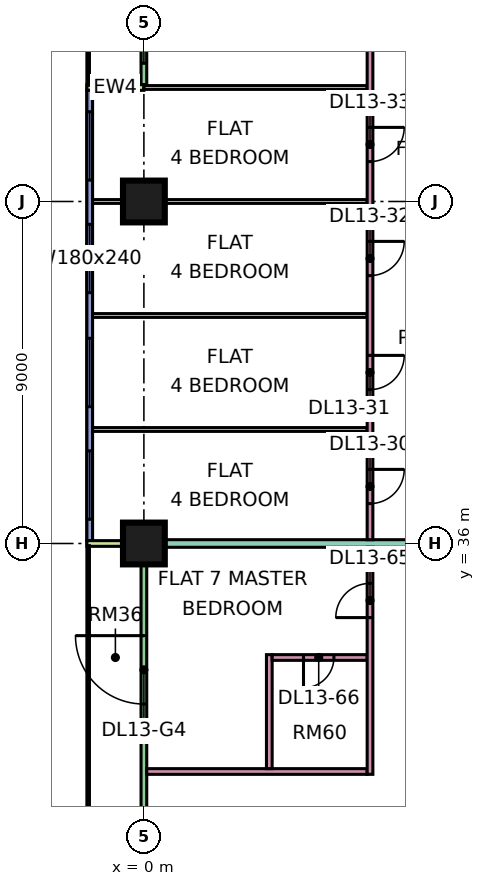
"""IFC4 building model, lengths in metres.
Left out: names, types, materials, properties, quantities, classifications, styles, units other than length and angle.
Written with IfcOpenShell. Run it as: python <this file> out.ifc"""

import sys

from ifc_helpers import new_model, si_unit, direction, frame, frame_2d, origin, origin_2d, place, context, subcontext, project, spatial, rectangle, extrude, element, fill, save


model = new_model("IFC4")
c1 = context("Model", 3, precision=1e-05, world=origin(), true_north=direction((0.0, 1.0)))
c2 = subcontext(c1, "Body", "Model", "MODEL_VIEW")
j1 = project(units=[si_unit("LENGTHUNIT", "METRE"), si_unit("PLANEANGLEUNIT", "RADIAN")], contexts=[c1])
p1 = place(None, origin())
s1 = spatial("IfcSite", under=j1, at=p1, CompositionType="ELEMENT")
p2 = place(p1, origin())
s2 = spatial("IfcBuilding", under=s1, at=p2, CompositionType="ELEMENT")
p3 = place(p2, frame((0.0, 0.0, 63.9)))
s3 = spatial("IfcBuildingStorey", under=s2, at=p3, CompositionType="ELEMENT", Elevation=63.9)
p4 = place(p3, frame((0.0, 36.0, 0.0), z_axis=(0.0, 0.0, 1.0), x_axis=(1.0, 0.0, 0.0)))
e1 = element("IfcColumn", 1, at=p4, inside=s3, PredefinedType="COLUMN", context=c2, shape_type="SweptSolid", body=[
    extrude(rectangle(XDim=1.1, YDim=1.1, at=origin_2d()), origin(), (0.0, 0.0, 1.0), 3.75),
])
p5 = place(p3, frame((0.0, 45.0, 0.0), z_axis=(0.0, 0.0, 1.0), x_axis=(1.0, 0.0, 0.0)))
e2 = element("IfcColumn", 2, at=p5, inside=s3, PredefinedType="COLUMN", context=c2, shape_type="SweptSolid", body=[
    extrude(rectangle(XDim=1.1, YDim=1.1, at=origin_2d()), origin(), (0.0, 0.0, 1.0), 3.75),
])
p6 = place(p3, frame((0.0, 61.425, 0.0), z_axis=(0.0, 0.0, 1.0), x_axis=(0.0, -1.0, 0.0)))
e3 = element("IfcWall", 3, at=p6, inside=s3, PredefinedType="SOLIDWALL", context=c2, shape_type="SweptSolid", body=[
    extrude(rectangle(XDim=13.35, YDim=0.15, at=frame_2d((6.675, 0.0))), origin(), (0.0, 0.0, 1.0), 3.35),
])
p7 = place(p6, frame((1.312, 0.0, 0.0)))
e4 = element("IfcOpeningElement", 4, at=p7, cuts=e3, PredefinedType="OPENING", context=c2, shape_type="SweptSolid", body=[
    extrude(rectangle(XDim=1.8, YDim=2.4, at=frame_2d((0.9, 1.2))), frame((0.0, 0.085, 0.0), z_axis=(0.0, -1.0, 0.0), x_axis=(1.0, 0.0, 0.0)), (0.0, 0.0, 1.0), 0.17),
])
p8 = place(p6, frame((5.0, 0.0, 0.45)))
e5 = element("IfcOpeningElement", 5, at=p8, cuts=e3, PredefinedType="OPENING", context=c2, shape_type="SweptSolid", body=[
    extrude(rectangle(XDim=1.2, YDim=2.4, at=frame_2d((0.6, 1.2))), frame((0.0, 0.085, 0.0), z_axis=(0.0, -1.0, 0.0), x_axis=(1.0, 0.0, 0.0)), (0.0, 0.0, 1.0), 0.17),
])
p9 = place(p6, frame((8.65, 0.0, 0.45)))
e6 = element("IfcOpeningElement", 6, at=p9, cuts=e3, PredefinedType="OPENING", context=c2, shape_type="SweptSolid", body=[
    extrude(rectangle(XDim=1.2, YDim=2.4, at=frame_2d((0.6, 1.2))), frame((0.0, 0.085, 0.0), z_axis=(0.0, -1.0, 0.0), x_axis=(1.0, 0.0, 0.0)), (0.0, 0.0, 1.0), 0.17),
])
p10 = place(p6, frame((10.988, 0.0, 0.45)))
e7 = element("IfcOpeningElement", 7, at=p10, cuts=e3, PredefinedType="OPENING", context=c2, shape_type="SweptSolid", body=[
    extrude(rectangle(XDim=1.8, YDim=2.4, at=frame_2d((0.9, 1.2))), frame((0.0, 0.085, 0.0), z_axis=(0.0, -1.0, 0.0), x_axis=(1.0, 0.0, 0.0)), (0.0, 0.0, 1.0), 0.17),
])
p11 = place(p3, frame((-1.5, 48.0, 0.0), z_axis=(0.0, 0.0, 1.0), x_axis=(1.0, 0.0, 0.0)))
e8 = element("IfcWall", 8, at=p11, inside=s3, PredefinedType="SOLIDWALL", context=c2, shape_type="SweptSolid", body=[
    extrude(rectangle(XDim=1.5, YDim=0.15, at=frame_2d((0.75, 0.0))), origin(), (0.0, 0.0, 1.0), 3.35),
])
p12 = place(p3, frame((-1.425, 47.925, 0.0), z_axis=(0.0, 0.0, 1.0), x_axis=(0.0, -1.0, 0.0)))
e9 = element("IfcWall", 9, at=p12, inside=s3, PredefinedType="SOLIDWALL", context=c2, shape_type="SweptSolid", body=[
    extrude(rectangle(XDim=11.85, YDim=0.15, at=frame_2d((5.925, 0.0))), origin(), (0.0, 0.0, 1.0), 3.35),
])
p13 = place(p12, frame((0.562, 0.0, 0.45)))
e10 = element("IfcOpeningElement", 10, at=p13, cuts=e9, PredefinedType="OPENING", context=c2, shape_type="SweptSolid", body=[
    extrude(rectangle(XDim=1.8, YDim=2.4, at=frame_2d((0.9, 1.2))), frame((0.0, 0.085, 0.0), z_axis=(0.0, -1.0, 0.0), x_axis=(1.0, 0.0, 0.0)), (0.0, 0.0, 1.0), 0.17),
])
p14 = place(p12, frame((3.525, 0.0, 0.45)))
e11 = element("IfcOpeningElement", 11, at=p14, cuts=e9, PredefinedType="OPENING", context=c2, shape_type="SweptSolid", body=[
    extrude(rectangle(XDim=1.8, YDim=2.4, at=frame_2d((0.9, 1.2))), frame((0.0, 0.085, 0.0), z_axis=(0.0, -1.0, 0.0), x_axis=(1.0, 0.0, 0.0)), (0.0, 0.0, 1.0), 0.17),
])
p15 = place(p12, frame((6.525, 0.0, 0.45)))
e12 = element("IfcOpeningElement", 12, at=p15, cuts=e9, PredefinedType="OPENING", context=c2, shape_type="SweptSolid", body=[
    extrude(rectangle(XDim=1.8, YDim=2.4, at=frame_2d((0.9, 1.2))), frame((0.0, 0.085, 0.0), z_axis=(0.0, -1.0, 0.0), x_axis=(1.0, 0.0, 0.0)), (0.0, 0.0, 1.0), 0.17),
])
p16 = place(p12, frame((9.488, 0.0, 0.45)))
e13 = element("IfcOpeningElement", 13, at=p16, cuts=e9, PredefinedType="OPENING", context=c2, shape_type="SweptSolid", body=[
    extrude(rectangle(XDim=1.8, YDim=2.4, at=frame_2d((0.9, 1.2))), frame((0.0, 0.085, 0.0), z_axis=(0.0, -1.0, 0.0), x_axis=(1.0, 0.0, 0.0)), (0.0, 0.0, 1.0), 0.17),
])
p17 = place(p3, frame((0.0, 35.925, 0.0), z_axis=(0.0, 0.0, 1.0), x_axis=(0.0, -1.0, 0.0)))
e14 = element("IfcWall", 14, at=p17, inside=s3, PredefinedType="SOLIDWALL", context=c2, shape_type="SweptSolid", body=[
    extrude(rectangle(XDim=11.85, YDim=0.15, at=frame_2d((5.925, 0.0))), origin(), (0.0, 0.0, 1.0), 3.35),
])
p18 = place(p17, frame((2.35, 0.0, 0.0)))
e15 = element("IfcOpeningElement", 15, at=p18, cuts=e14, PredefinedType="OPENING", context=c2, shape_type="SweptSolid", body=[
    extrude(rectangle(XDim=1.8, YDim=2.4, at=frame_2d((0.9, 1.2))), frame((0.0, 0.085, 0.0), z_axis=(0.0, -1.0, 0.0), x_axis=(1.0, 0.0, 0.0)), (0.0, 0.0, 1.0), 0.17),
])
p19 = place(p17, frame((7.1, 0.0, 0.45)))
e16 = element("IfcOpeningElement", 16, at=p19, cuts=e14, PredefinedType="OPENING", context=c2, shape_type="SweptSolid", body=[
    extrude(rectangle(XDim=3.0, YDim=2.4, at=frame_2d((1.5, 1.2))), frame((0.0, 0.085, 0.0), z_axis=(0.0, -1.0, 0.0), x_axis=(1.0, 0.0, 0.0)), (0.0, 0.0, 1.0), 0.17),
])
p20 = place(p3, frame((-1.5, 36.0, 0.0), z_axis=(0.0, 0.0, 1.0), x_axis=(1.0, 0.0, 0.0)))
e17 = element("IfcWall", 17, at=p20, inside=s3, PredefinedType="SOLIDWALL", context=c2, shape_type="SweptSolid", body=[
    extrude(rectangle(XDim=1.5, YDim=0.15, at=frame_2d((0.75, 0.0))), origin(), (0.0, 0.0, 1.0), 3.35),
])
for number, where, z_axis, x_axis in (
    (18, (-1.351, 39.0, 0.0), (0.0, 0.0, 1.0), (1.0, 0.0, 0.0)),
    (19, (-1.351, 42.0, 0.0), (0.0, 0.0, 1.0), (1.0, 0.0, 0.0)),
    (20, (-1.351, 45.0, 0.0), (0.0, 0.0, 1.0), (1.0, 0.0, 0.0)),
):
    element("IfcWall", number, at=place(p3, frame(where, z_axis=z_axis, x_axis=x_axis)), inside=s3, PredefinedType="PARTITIONING", context=c2, shape_type="SweptSolid", body=[
        extrude(rectangle(XDim=7.226, YDim=0.1, at=frame_2d((3.613, 0.0))), origin(), (0.0, 0.0, 1.0), 3.35),
    ])
e21 = element("IfcWall", 21, at=p4, inside=s3, PredefinedType="PARTITIONING", context=c2, shape_type="SweptSolid", body=[
    extrude(rectangle(XDim=12.45, YDim=0.2, at=frame_2d((6.225, 0.0))), origin(), (0.0, 0.0, 1.0), 3.35),
])
p21 = place(p3, frame((0.0, 48.0, 0.0), z_axis=(0.0, 0.0, 1.0), x_axis=(1.0, 0.0, 0.0)))
e22 = element("IfcWall", 22, at=p21, inside=s3, PredefinedType="PARTITIONING", context=c2, shape_type="SweptSolid", body=[
    extrude(rectangle(XDim=5.875, YDim=0.1, at=frame_2d((2.938, 0.0))), origin(), (0.0, 0.0, 1.0), 3.35),
])
p22 = place(p3, frame((0.074, 30.0, 0.0), z_axis=(0.0, 0.0, 1.0), x_axis=(1.0, 0.0, 0.0)))
e23 = element("IfcWall", 23, at=p22, inside=s3, PredefinedType="PARTITIONING", context=c2, shape_type="SweptSolid", body=[
    extrude(rectangle(XDim=5.801, YDim=0.15, at=frame_2d((2.9, 0.0))), origin(), (0.0, 0.0, 1.0), 3.35),
])
p23 = place(p3, frame((3.3, 30.075, 0.0), z_axis=(0.0, 0.0, 1.0), x_axis=(0.0, 1.0, 0.0)))
e24 = element("IfcWall", 24, at=p23, inside=s3, PredefinedType="PARTITIONING", context=c2, shape_type="SweptSolid", body=[
    extrude(rectangle(XDim=3.0, YDim=0.15, at=frame_2d((1.5, 0.0))), origin(), (0.0, 0.0, 1.0), 3.35),
])
p24 = place(p3, frame((3.375, 33.0, 0.0), z_axis=(0.0, 0.0, 1.0), x_axis=(1.0, 0.0, 0.0)))
e25 = element("IfcWall", 25, at=p24, inside=s3, PredefinedType="PARTITIONING", context=c2, shape_type="SweptSolid", body=[
    extrude(rectangle(XDim=2.5, YDim=0.15, at=frame_2d((1.25, 0.0))), origin(), (0.0, 0.0, 1.0), 3.35),
])
p25 = place(p24, frame((0.825, 0.0, 0.0)))
e26 = element("IfcOpeningElement", 26, at=p25, cuts=e25, PredefinedType="OPENING", context=c2, shape_type="SweptSolid", body=[
    extrude(rectangle(XDim=0.8, YDim=2.1, at=frame_2d((0.4, 1.05))), frame((0.0, 0.085, 0.0), z_axis=(0.0, -1.0, 0.0), x_axis=(1.0, 0.0, 0.0)), (0.0, 0.0, 1.0), 0.17),
])
p26 = place(p3, frame((5.95, 29.925, 0.0), z_axis=(0.0, 0.0, 1.0), x_axis=(0.0, 1.0, 0.0)))
e27 = element("IfcWall", 27, at=p26, inside=s3, PredefinedType="PARTITIONING", context=c2, shape_type="SweptSolid", body=[
    extrude(rectangle(XDim=5.975, YDim=0.15, at=frame_2d((2.987, 0.0))), origin(), (0.0, 0.0, 1.0), 3.35),
])
p27 = place(p26, frame((4.125, 0.0, 0.0)))
e28 = element("IfcOpeningElement", 28, at=p27, cuts=e27, PredefinedType="OPENING", context=c2, shape_type="SweptSolid", body=[
    extrude(rectangle(XDim=0.9, YDim=2.1, at=frame_2d((0.45, 1.05))), frame((0.0, 0.085, 0.0), z_axis=(0.0, -1.0, 0.0), x_axis=(1.0, 0.0, 0.0)), (0.0, 0.0, 1.0), 0.17),
])
p28 = place(p3, frame((5.95, 36.1, 0.0), z_axis=(0.0, 0.0, 1.0), x_axis=(0.0, 1.0, 0.0)))
e29 = element("IfcWall", 29, at=p28, inside=s3, PredefinedType="PARTITIONING", context=c2, shape_type="SweptSolid", body=[
    extrude(rectangle(XDim=26.826, YDim=0.15, at=frame_2d((13.413, 0.0))), origin(), (0.0, 0.0, 1.0), 3.35),
])
p29 = place(p28, frame((0.95, 0.0, 0.0)))
e30 = element("IfcOpeningElement", 30, at=p29, cuts=e29, PredefinedType="OPENING", context=c2, shape_type="SweptSolid", body=[
    extrude(rectangle(XDim=0.9, YDim=2.1, at=frame_2d((0.45, 1.05))), frame((0.0, 0.085, 0.0), z_axis=(0.0, -1.0, 0.0), x_axis=(1.0, 0.0, 0.0)), (0.0, 0.0, 1.0), 0.17),
])
p30 = place(p28, frame((3.95, 0.0, 0.0)))
e31 = element("IfcOpeningElement", 31, at=p30, cuts=e29, PredefinedType="OPENING", context=c2, shape_type="SweptSolid", body=[
    extrude(rectangle(XDim=0.9, YDim=2.1, at=frame_2d((0.45, 1.05))), frame((0.0, 0.085, 0.0), z_axis=(0.0, -1.0, 0.0), x_axis=(1.0, 0.0, 0.0)), (0.0, 0.0, 1.0), 0.17),
])
p31 = place(p28, frame((6.95, 0.0, 0.0)))
e32 = element("IfcOpeningElement", 32, at=p31, cuts=e29, PredefinedType="OPENING", context=c2, shape_type="SweptSolid", body=[
    extrude(rectangle(XDim=0.9, YDim=2.1, at=frame_2d((0.45, 1.05))), frame((0.0, 0.085, 0.0), z_axis=(0.0, -1.0, 0.0), x_axis=(1.0, 0.0, 0.0)), (0.0, 0.0, 1.0), 0.17),
])
p32 = place(p28, frame((9.95, 0.0, 0.0)))
e33 = element("IfcOpeningElement", 33, at=p32, cuts=e29, PredefinedType="OPENING", context=c2, shape_type="SweptSolid", body=[
    extrude(rectangle(XDim=0.9, YDim=2.1, at=frame_2d((0.45, 1.05))), frame((0.0, 0.085, 0.0), z_axis=(0.0, -1.0, 0.0), x_axis=(1.0, 0.0, 0.0)), (0.0, 0.0, 1.0), 0.17),
])
p33 = place(p28, frame((18.95, 0.0, 0.0)))
e34 = element("IfcOpeningElement", 34, at=p33, cuts=e29, PredefinedType="OPENING", context=c2, shape_type="SweptSolid", body=[
    extrude(rectangle(XDim=0.9, YDim=2.1, at=frame_2d((0.45, 1.05))), frame((0.0, 0.085, 0.0), z_axis=(0.0, -1.0, 0.0), x_axis=(1.0, 0.0, 0.0)), (0.0, 0.0, 1.0), 0.17),
])
p34 = place(p28, frame((23.45, 0.0, 0.0)))
e35 = element("IfcOpeningElement", 35, at=p34, cuts=e29, PredefinedType="OPENING", context=c2, shape_type="SweptSolid", body=[
    extrude(rectangle(XDim=0.9, YDim=2.1, at=frame_2d((0.45, 1.05))), frame((0.0, 0.085, 0.0), z_axis=(0.0, -1.0, 0.0), x_axis=(1.0, 0.0, 0.0)), (0.0, 0.0, 1.0), 0.17),
])
p35 = place(p28, frame((15.55, 0.0, 0.0)))
e36 = element("IfcOpeningElement", 36, at=p35, cuts=e29, PredefinedType="OPENING", context=c2, shape_type="SweptSolid", body=[
    extrude(rectangle(XDim=1.6, YDim=2.1, at=frame_2d((0.8, 1.05))), frame((0.0, 0.085, 0.0), z_axis=(0.0, -1.0, 0.0), x_axis=(1.0, 0.0, 0.0)), (0.0, 0.0, 1.0), 0.17),
])
p36 = place(p28, frame((12.95, 0.0, 0.0)))
e37 = element("IfcOpeningElement", 37, at=p36, cuts=e29, PredefinedType="OPENING", context=c2, shape_type="SweptSolid", body=[
    extrude(rectangle(XDim=0.9, YDim=2.1, at=frame_2d((0.45, 1.05))), frame((0.0, 0.085, 0.0), z_axis=(0.0, -1.0, 0.0), x_axis=(1.0, 0.0, 0.0)), (0.0, 0.0, 1.0), 0.17),
])
p37 = place(p10, origin())
e38 = element("IfcWindow", 38, at=p37, inside=s3, PartitioningType="SINGLE_PANEL", PredefinedType="WINDOW", context=c2, shape_type="SweptSolid", body=[
    extrude(rectangle(XDim=1.8, YDim=2.4, at=frame_2d((0.9, 1.2))), frame((0.0, 0.03, 0.0), z_axis=(0.0, -1.0, 0.0), x_axis=(1.0, 0.0, 0.0)), (0.0, 0.0, 1.0), 0.06),
])
fill(e7, e38)
p38 = place(p13, origin())
e39 = element("IfcWindow", 39, at=p38, inside=s3, PartitioningType="SINGLE_PANEL", PredefinedType="WINDOW", context=c2, shape_type="SweptSolid", body=[
    extrude(rectangle(XDim=1.8, YDim=2.4, at=frame_2d((0.9, 1.2))), frame((0.0, 0.03, 0.0), z_axis=(0.0, -1.0, 0.0), x_axis=(1.0, 0.0, 0.0)), (0.0, 0.0, 1.0), 0.06),
])
fill(e10, e39)
p39 = place(p14, origin())
e40 = element("IfcWindow", 40, at=p39, inside=s3, PartitioningType="SINGLE_PANEL", PredefinedType="WINDOW", context=c2, shape_type="SweptSolid", body=[
    extrude(rectangle(XDim=1.8, YDim=2.4, at=frame_2d((0.9, 1.2))), frame((0.0, 0.03, 0.0), z_axis=(0.0, -1.0, 0.0), x_axis=(1.0, 0.0, 0.0)), (0.0, 0.0, 1.0), 0.06),
])
fill(e11, e40)
p40 = place(p15, origin())
e41 = element("IfcWindow", 41, at=p40, inside=s3, PartitioningType="SINGLE_PANEL", PredefinedType="WINDOW", context=c2, shape_type="SweptSolid", body=[
    extrude(rectangle(XDim=1.8, YDim=2.4, at=frame_2d((0.9, 1.2))), frame((0.0, 0.03, 0.0), z_axis=(0.0, -1.0, 0.0), x_axis=(1.0, 0.0, 0.0)), (0.0, 0.0, 1.0), 0.06),
])
fill(e12, e41)
p41 = place(p16, origin())
e42 = element("IfcWindow", 42, at=p41, inside=s3, PartitioningType="SINGLE_PANEL", PredefinedType="WINDOW", context=c2, shape_type="SweptSolid", body=[
    extrude(rectangle(XDim=1.8, YDim=2.4, at=frame_2d((0.9, 1.2))), frame((0.0, 0.03, 0.0), z_axis=(0.0, -1.0, 0.0), x_axis=(1.0, 0.0, 0.0)), (0.0, 0.0, 1.0), 0.06),
])
fill(e13, e42)
p42 = place(p18, frame((1.8, 0.0, 0.0), z_axis=(0.0, 0.0, 1.0), x_axis=(-1.0, 0.0, 0.0)))
e43 = element("IfcDoor", 43, at=p42, inside=s3, OperationType="DOUBLE_DOOR_SINGLE_SWING", PredefinedType="DOOR", context=c2, shape_type="SweptSolid", body=[
    extrude(rectangle(XDim=1.8, YDim=2.4, at=frame_2d((0.9, 1.2))), frame((0.0, 0.025, 0.0), z_axis=(0.0, -1.0, 0.0), x_axis=(1.0, 0.0, 0.0)), (0.0, 0.0, 1.0), 0.05),
])
fill(e15, e43)
p43 = place(p29, origin())
e44 = element("IfcDoor", 44, at=p43, inside=s3, OperationType="SINGLE_SWING_RIGHT", PredefinedType="DOOR", context=c2, shape_type="SweptSolid", body=[
    extrude(rectangle(XDim=0.9, YDim=2.1, at=frame_2d((0.45, 1.05))), frame((0.0, 0.025, 0.0), z_axis=(0.0, -1.0, 0.0), x_axis=(1.0, 0.0, 0.0)), (0.0, 0.0, 1.0), 0.05),
])
fill(e30, e44)
p44 = place(p30, origin())
e45 = element("IfcDoor", 45, at=p44, inside=s3, OperationType="SINGLE_SWING_RIGHT", PredefinedType="DOOR", context=c2, shape_type="SweptSolid", body=[
    extrude(rectangle(XDim=0.9, YDim=2.1, at=frame_2d((0.45, 1.05))), frame((0.0, 0.025, 0.0), z_axis=(0.0, -1.0, 0.0), x_axis=(1.0, 0.0, 0.0)), (0.0, 0.0, 1.0), 0.05),
])
fill(e31, e45)
p45 = place(p31, origin())
e46 = element("IfcDoor", 46, at=p45, inside=s3, OperationType="SINGLE_SWING_RIGHT", PredefinedType="DOOR", context=c2, shape_type="SweptSolid", body=[
    extrude(rectangle(XDim=0.9, YDim=2.1, at=frame_2d((0.45, 1.05))), frame((0.0, 0.025, 0.0), z_axis=(0.0, -1.0, 0.0), x_axis=(1.0, 0.0, 0.0)), (0.0, 0.0, 1.0), 0.05),
])
fill(e32, e46)
p46 = place(p32, origin())
e47 = element("IfcDoor", 47, at=p46, inside=s3, OperationType="SINGLE_SWING_RIGHT", PredefinedType="DOOR", context=c2, shape_type="SweptSolid", body=[
    extrude(rectangle(XDim=0.9, YDim=2.1, at=frame_2d((0.45, 1.05))), frame((0.0, 0.025, 0.0), z_axis=(0.0, -1.0, 0.0), x_axis=(1.0, 0.0, 0.0)), (0.0, 0.0, 1.0), 0.05),
])
fill(e33, e47)
p47 = place(p27, origin())
e48 = element("IfcDoor", 48, at=p47, inside=s3, OperationType="SINGLE_SWING_LEFT", PredefinedType="DOOR", context=c2, shape_type="SweptSolid", body=[
    extrude(rectangle(XDim=0.9, YDim=2.1, at=frame_2d((0.45, 1.05))), frame((0.0, 0.025, 0.0), z_axis=(0.0, -1.0, 0.0), x_axis=(1.0, 0.0, 0.0)), (0.0, 0.0, 1.0), 0.05),
])
fill(e28, e48)
p48 = place(p25, frame((0.8, 0.0, 0.0), z_axis=(0.0, 0.0, 1.0), x_axis=(-1.0, 0.0, 0.0)))
e49 = element("IfcDoor", 49, at=p48, inside=s3, OperationType="SINGLE_SWING_LEFT", PredefinedType="DOOR", context=c2, shape_type="SweptSolid", body=[
    extrude(rectangle(XDim=0.8, YDim=2.1, at=frame_2d((0.4, 1.05))), frame((0.0, 0.025, 0.0), z_axis=(0.0, -1.0, 0.0), x_axis=(1.0, 0.0, 0.0)), (0.0, 0.0, 1.0), 0.05),
])
fill(e26, e49)
save(model, sys.argv[1])
